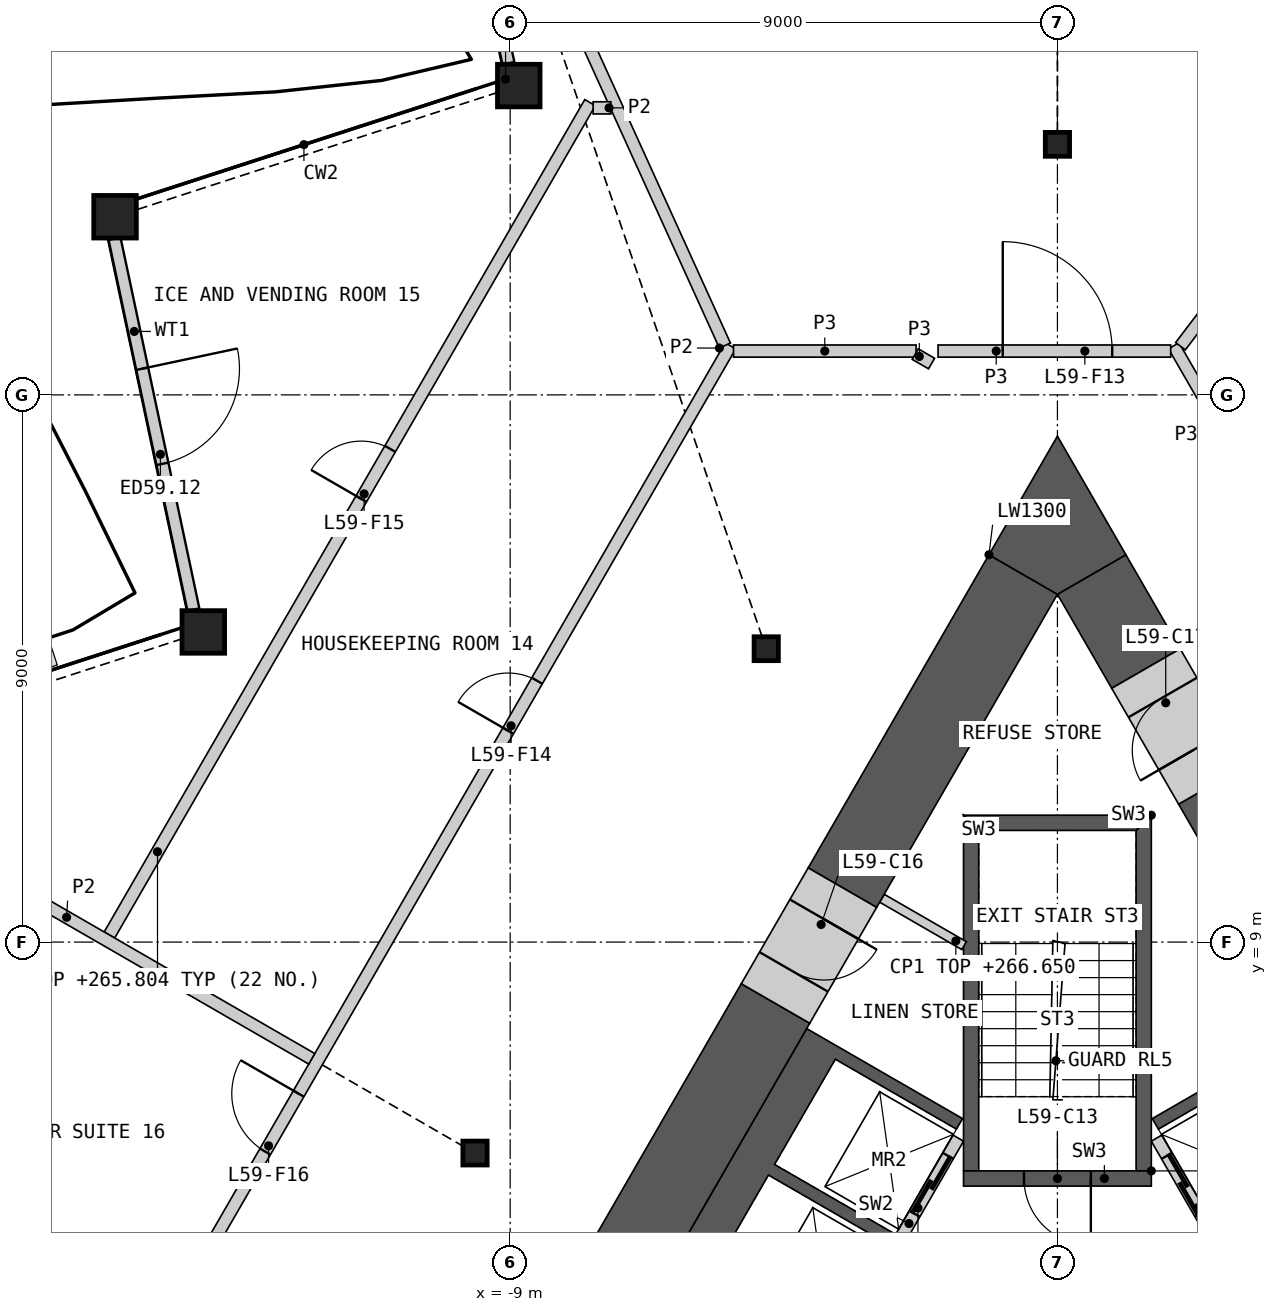
"""IFC4 building model, lengths in metres.
Left out: names, types, materials, properties, quantities, classifications, styles, units other than length and angle.
Written with IfcOpenShell. Run it as: python <this file> out.ifc"""

import sys

from ifc_helpers import new_model, si_unit, direction, frame, frame_2d, origin, origin_2d, place, context, subcontext, project, spatial, polyline, rectangle, hollow_rectangle, i_section, outline, extrude, element, fill, save


model = new_model("IFC4")
c1 = context("Model", 3, precision=1e-05, world=origin(), true_north=direction((0.0, 1.0)))
c2 = subcontext(c1, "Body", "Model", "MODEL_VIEW")
j1 = project(units=[si_unit("LENGTHUNIT", "METRE"), si_unit("PLANEANGLEUNIT", "RADIAN")], contexts=[c1])
p1 = place(None, origin())
s1 = spatial("IfcSite", under=j1, at=p1, CompositionType="ELEMENT")
p2 = place(p1, origin())
s2 = spatial("IfcBuilding", under=s1, at=p2, CompositionType="ELEMENT")
p3 = place(p2, frame((0.0, 0.0, 263.4)))
s3 = spatial("IfcBuildingStorey", under=s2, at=p3, CompositionType="ELEMENT", Elevation=263.4)
for number, where, z_axis, x_axis in (
    (1, (-8.859, 23.087, 0.0), (0.0, 0.0, 1.0), (1.0, 0.0, 0.0)),
    (2, (-15.499, 20.93, 0.0), (0.0, 0.0, 1.0), (1.0, 0.0, 0.0)),
    (3, (-14.047, 14.101, 0.0), (0.0, 0.0, 1.0), (1.0, 0.0, 0.0)),
):
    element("IfcColumn", number, at=place(p3, frame(where, z_axis=z_axis, x_axis=x_axis)), inside=s3, PredefinedType="COLUMN", context=c2, shape_type="SweptSolid", body=[
        extrude(hollow_rectangle(XDim=0.7, YDim=0.7, WallThickness=0.045, at=origin_2d()), origin(), (0.0, 0.0, 1.0), 3.6),
    ])
for number, where, z_axis, x_axis in (
    (4, (0.0, 22.121, 0.0), (0.0, 0.0, 1.0), (1.0, 0.0, 0.0)),
    (5, (-4.789, 13.825, 0.0), (0.0, 0.0, 1.0), (1.0, 0.0, 0.0)),
    (6, (-9.578, 5.53, 0.0), (0.0, 0.0, 1.0), (1.0, 0.0, 0.0)),
):
    element("IfcColumn", number, at=place(p3, frame(where, z_axis=z_axis, x_axis=x_axis)), inside=s3, PredefinedType="COLUMN", context=c2, shape_type="SweptSolid", body=[
        extrude(i_section(OverallWidth=0.399, OverallDepth=0.393, WebThickness=0.023, FlangeThickness=0.037, at=origin_2d()), origin(), (0.0, 0.0, 1.0), 3.6),
    ])
p4 = place(p3, frame((-10.324, 29.545, 0.0), z_axis=(0.0, 0.0, 1.0), x_axis=(0.207930490886, -0.978143604467, 0.0)))
e7 = element("IfcWall", 7, at=p4, inside=s3, PredefinedType="SOLIDWALL", context=c2, shape_type="SweptSolid", body=[
    extrude(rectangle(XDim=6.228, YDim=0.2, at=frame_2d((3.114, 0.0))), origin(), (0.0, 0.0, 1.0), 2.404),
])
p5 = place(p4, frame((2.186, 0.0, 0.0)))
e8 = element("IfcOpeningElement", 8, at=p5, cuts=e7, PredefinedType="OPENING", context=c2, shape_type="SweptSolid", body=[
    extrude(rectangle(XDim=1.6, YDim=2.4, at=frame_2d((0.8, 1.2))), frame((0.0, 0.11, 0.0), z_axis=(0.0, -1.0, 0.0), x_axis=(1.0, 0.0, 0.0)), (0.0, 0.0, 1.0), 0.22),
])
p6 = place(p3, frame((-15.506, 20.569, 0.0), z_axis=(0.0, 0.0, 1.0), x_axis=(0.207911652145, -0.978147608954, 0.0)))
e9 = element("IfcWall", 9, at=p6, inside=s3, PredefinedType="SOLIDWALL", context=c2, shape_type="SweptSolid", body=[
    extrude(rectangle(XDim=6.238, YDim=0.2, at=frame_2d((3.119, 0.0))), origin(), (0.0, 0.0, 1.0), 2.701),
])
p7 = place(p6, frame((2.186, 0.0, 0.0)))
e10 = element("IfcOpeningElement", 10, at=p7, cuts=e9, PredefinedType="OPENING", context=c2, shape_type="SweptSolid", body=[
    extrude(rectangle(XDim=1.6, YDim=2.4, at=frame_2d((0.8, 1.2))), frame((0.0, 0.11, 0.0), z_axis=(0.0, -1.0, 0.0), x_axis=(1.0, 0.0, 0.0)), (0.0, 0.0, 1.0), 0.22),
])
p8 = place(p3, origin())
e11 = element("IfcWall", 11, at=p8, inside=s3, PredefinedType="SHEAR", context=c2, shape_type="SweptSolid", body=[
    extrude(outline(polyline([(5.324, 5.499), (4.931, 5.272), (2.76, 4.019), (2.66, 4.192), (4.652, 5.342), (3.652, 7.074), (1.66, 5.924), (1.561, 6.097), (3.731, 7.35), (4.124, 7.577), (5.324, 5.499)])), origin(), (0.0, 0.0, 1.0), 3.25),
])
p9 = place(p3, frame((5.817, -1.476, 0.0), z_axis=(0.0, 0.0, 1.0), x_axis=(-0.500002616675, 0.866023893041, 0.0)))
e12 = element("IfcWall", 12, at=p9, inside=s3, PredefinedType="SOLIDWALL", context=c2, shape_type="SweptSolid", body=[
    extrude(rectangle(XDim=8.373, YDim=0.2, at=frame_2d((4.187, 0.0))), origin(), (0.0, 0.0, 1.0), 3.25),
])
p10 = place(p9, frame((1.537, 0.0, 0.0)))
e13 = element("IfcOpeningElement", 13, at=p10, cuts=e12, PredefinedType="OPENING", context=c2, shape_type="SweptSolid", body=[
    extrude(rectangle(XDim=0.9, YDim=2.1, at=frame_2d((0.45, 1.05))), frame((0.0, 0.11, 0.0), z_axis=(0.0, -1.0, 0.0), x_axis=(1.0, 0.0, 0.0)), (0.0, 0.0, 1.0), 0.22),
])
p11 = place(p9, frame((4.837, 0.0, 0.0)))
e14 = element("IfcOpeningElement", 14, at=p11, cuts=e12, PredefinedType="OPENING", context=c2, shape_type="SweptSolid", body=[
    extrude(rectangle(XDim=0.9, YDim=2.1, at=frame_2d((0.45, 1.05))), frame((0.0, 0.11, 0.0), z_axis=(0.0, -1.0, 0.0), x_axis=(1.0, 0.0, 0.0)), (0.0, 0.0, 1.0), 0.22),
])
p12 = place(p9, frame((6.937, 0.0, 0.0)))
e15 = element("IfcOpeningElement", 15, at=p12, cuts=e12, PredefinedType="OPENING", context=c2, shape_type="SweptSolid", body=[
    extrude(rectangle(XDim=1.1, YDim=2.1, at=frame_2d((0.55, 1.05))), frame((0.0, 0.11, 0.0), z_axis=(0.0, -1.0, 0.0), x_axis=(1.0, 0.0, 0.0)), (0.0, 0.0, 1.0), 0.22),
])
p13 = place(p3, origin())
e16 = element("IfcWall", 16, at=p13, inside=s3, PredefinedType="SHEAR", context=c2, shape_type="SweptSolid", body=[
    extrude(outline(polyline([(-7.524, 1.688), (-4.124, 7.577), (-3.731, 7.35), (-1.561, 6.097), (-1.66, 5.924), (-3.652, 7.074), (-4.652, 5.342), (-2.66, 4.192), (-2.76, 4.019), (-4.752, 5.169), (-5.752, 3.437), (-3.76, 2.287), (-3.861, 2.113), (-5.852, 3.263), (-6.852, 1.531), (-4.861, 0.381), (-4.96, 0.208), (-7.131, 1.461), (-7.524, 1.688)])), origin(), (0.0, 0.0, 1.0), 3.25),
])
p14 = place(p3, frame((-1.631, 5.776, 0.0), z_axis=(0.0, 0.0, 1.0), x_axis=(-0.499992876559, -0.866029516466, 0.0)))
e17 = element("IfcWall", 17, at=p14, inside=s3, PredefinedType="SOLIDWALL", context=c2, shape_type="SweptSolid", body=[
    extrude(rectangle(XDim=6.486, YDim=0.2, at=frame_2d((3.243, 0.0))), origin(), (0.0, 0.0, 1.0), 3.25),
])
p15 = place(p14, frame((0.337, 0.0, 0.0)))
e18 = element("IfcOpeningElement", 18, at=p15, cuts=e17, PredefinedType="OPENING", context=c2, shape_type="SweptSolid", body=[
    extrude(rectangle(XDim=1.1, YDim=2.1, at=frame_2d((0.55, 1.05))), frame((0.0, 0.11, 0.0), z_axis=(0.0, -1.0, 0.0), x_axis=(1.0, 0.0, 0.0)), (0.0, 0.0, 1.0), 0.22),
])
p16 = place(p14, frame((2.537, 0.0, 0.0)))
e19 = element("IfcOpeningElement", 19, at=p16, cuts=e17, PredefinedType="OPENING", context=c2, shape_type="SweptSolid", body=[
    extrude(rectangle(XDim=1.1, YDim=2.1, at=frame_2d((0.55, 1.05))), frame((0.0, 0.11, 0.0), z_axis=(0.0, -1.0, 0.0), x_axis=(1.0, 0.0, 0.0)), (0.0, 0.0, 1.0), 0.22),
])
p17 = place(p3, origin())
e20 = element("IfcWall", 20, at=p17, inside=s3, PredefinedType="SHEAR", context=c2, shape_type="SweptSolid", body=[
    extrude(outline(polyline([(1.544, 5.237), (1.544, 11.087), (1.294, 10.837), (1.294, 5.237), (1.544, 5.237)])), origin(), (0.0, 0.0, 1.0), 3.25),
])
p18 = place(p3, origin())
e21 = element("IfcWall", 21, at=p18, inside=s3, PredefinedType="SHEAR", context=c2, shape_type="SweptSolid", body=[
    extrude(outline(polyline([(1.544, 11.087), (-1.544, 11.087), (-1.294, 10.837), (1.294, 10.837), (1.544, 11.087)])), origin(), (0.0, 0.0, 1.0), 3.25),
])
p19 = place(p3, origin())
e22 = element("IfcWall", 22, at=p19, inside=s3, PredefinedType="SHEAR", context=c2, shape_type="SweptSolid", body=[
    extrude(outline(polyline([(-1.294, 10.837), (-1.544, 11.087), (-1.544, 5.237), (-1.294, 5.237), (-1.294, 10.837)])), origin(), (0.0, 0.0, 1.0), 3.25),
])
p20 = place(p3, frame((1.544, 5.112, 0.0), z_axis=(0.0, 0.0, 1.0), x_axis=(-1.0, 0.0, 0.0)))
e23 = element("IfcWall", 23, at=p20, inside=s3, PredefinedType="SHEAR", context=c2, shape_type="SweptSolid", body=[
    extrude(rectangle(XDim=3.088, YDim=0.25, at=frame_2d((1.544, 0.0))), origin(), (0.0, 0.0, 1.0), 3.25),
])
p21 = place(p20, frame((0.994, 0.0, 0.0)))
e24 = element("IfcOpeningElement", 24, at=p21, cuts=e23, PredefinedType="OPENING", context=c2, shape_type="SweptSolid", body=[
    extrude(rectangle(XDim=1.1, YDim=2.1, at=frame_2d((0.55, 1.05))), frame((0.0, 0.135, 0.0), z_axis=(0.0, -1.0, 0.0), x_axis=(1.0, 0.0, 0.0)), (0.0, 0.0, 1.0), 0.27),
])
p22 = place(p3, frame((-2.886, 9.721, 0.0), z_axis=(0.0, 0.0, 1.0), x_axis=(0.865990094875, -0.500061151839, 0.0)))
e25 = element("IfcWall", 25, at=p22, inside=s3, PredefinedType="PARTITIONING", context=c2, shape_type="SweptSolid", body=[
    extrude(rectangle(XDim=1.56, YDim=0.15, at=frame_2d((0.78, 0.0))), origin(), (0.0, 0.0, 1.0), 3.25),
])
p23 = place(p3, frame((10.081, -1.441, 0.0), z_axis=(0.0, 0.0, 1.0), x_axis=(-0.500012180433, 0.866018371294, 0.0)))
e26 = element("IfcWall", 26, at=p23, inside=s3, PredefinedType="SHEAR", context=c2, shape_type="SweptSolid", body=[
    extrude(rectangle(XDim=15.05, YDim=1.3, at=frame_2d((7.525, 0.0))), origin(), (0.0, 0.0, 1.0), 3.25),
])
p24 = place(p3, frame((1.456, 13.499, 0.0), z_axis=(0.0, 0.0, 1.0), x_axis=(-0.499990639951, 0.866030807744, 0.0)))
e27 = element("IfcWall", 27, at=p24, inside=s3, PredefinedType="SHEAR", context=c2, shape_type="SweptSolid", body=[
    extrude(rectangle(XDim=1.786, YDim=1.3, at=frame_2d((0.893, 0.0))), origin(), (0.0, 0.0, 1.0), 3.25),
])
p25 = place(p3, frame((-4.636, 7.99, 0.0), z_axis=(0.0, 0.0, 1.0), x_axis=(-0.500022813292, -0.866012232124, 0.0)))
e28 = element("IfcWall", 28, at=p25, inside=s3, PredefinedType="SHEAR", context=c2, shape_type="SweptSolid", body=[
    extrude(rectangle(XDim=6.802, YDim=1.3, at=frame_2d((3.401, 0.0))), origin(), (0.0, 0.0, 1.0), 3.25),
])
p26 = place(p3, frame((-0.563, 15.045, 0.0), z_axis=(0.0, 0.0, 1.0), x_axis=(-0.500011498138, -0.866018765229, 0.0)))
e29 = element("IfcWall", 29, at=p26, inside=s3, PredefinedType="SHEAR", context=c2, shape_type="SweptSolid", body=[
    extrude(rectangle(XDim=5.947, YDim=1.3, at=frame_2d((2.973, 0.0))), origin(), (0.0, 0.0, 1.0), 3.25),
])
p27 = place(p3, origin())
e30 = element("IfcWall", 30, at=p27, inside=s3, PredefinedType="SHEAR", context=c2, shape_type="SweptSolid", body=[
    extrude(outline(polyline([(-1.126, 15.371), (0.0, 17.321), (1.126, 15.371), (0.0, 14.72), (-1.126, 15.371)])), origin(), (0.0, 0.0, 1.0), 3.25),
])
p28 = place(p3, frame((-3.536, 9.896, 0.0), z_axis=(0.0, 0.0, 1.0), x_axis=(-0.499981787252, -0.866035918664, 0.0)))
e31 = element("IfcWall", 31, at=p28, inside=s3, PredefinedType="SHEAR", context=c2, shape_type="SweptSolid", body=[
    extrude(rectangle(XDim=2.2, YDim=1.3, at=frame_2d((1.1, 0.0))), origin(), (0.0, 0.0, 1.0), 3.25),
])
p29 = place(p28, frame((0.6, 0.0, 0.0)))
e32 = element("IfcOpeningElement", 32, at=p29, cuts=e31, PredefinedType="OPENING", context=c2, shape_type="SweptSolid", body=[
    extrude(rectangle(XDim=1.0, YDim=2.1, at=frame_2d((0.5, 1.05))), frame((0.0, 0.66, 0.0), z_axis=(0.0, -1.0, 0.0), x_axis=(1.0, 0.0, 0.0)), (0.0, 0.0, 1.0), 1.32),
])
p30 = place(p3, frame((2.556, 11.593, 0.0), z_axis=(0.0, 0.0, 1.0), x_axis=(-0.499946605688, 0.86605622881, 0.0)))
e33 = element("IfcWall", 33, at=p30, inside=s3, PredefinedType="SHEAR", context=c2, shape_type="SweptSolid", body=[
    extrude(rectangle(XDim=2.2, YDim=1.3, at=frame_2d((1.1, 0.0))), origin(), (0.0, 0.0, 1.0), 3.25),
])
p31 = place(p30, frame((0.65, 0.0, 0.0)))
e34 = element("IfcOpeningElement", 34, at=p31, cuts=e33, PredefinedType="OPENING", context=c2, shape_type="SweptSolid", body=[
    extrude(rectangle(XDim=1.0, YDim=2.1, at=frame_2d((0.5, 1.05))), frame((0.0, 0.66, 0.0), z_axis=(0.0, -1.0, 0.0), x_axis=(1.0, 0.0, 0.0)), (0.0, 0.0, 1.0), 1.32),
])
p32 = place(p3, frame((-18.976, -4.747, 0.0), z_axis=(0.0, 0.0, 1.0), x_axis=(0.499999852422, 0.866025488988, 0.0)))
e35 = element("IfcWall", 35, at=p32, inside=s3, PredefinedType="PARTITIONING", context=c2, shape_type="SweptSolid", body=[
    extrude(rectangle(XDim=27.198, YDim=0.2, at=frame_2d((13.599, 0.0))), origin(), (0.0, 0.0, 1.0), 3.25),
])
p33 = place(p32, frame((19.886, 0.0, 0.0)))
e36 = element("IfcOpeningElement", 36, at=p33, cuts=e35, PredefinedType="OPENING", context=c2, shape_type="SweptSolid", body=[
    extrude(rectangle(XDim=0.95, YDim=2.1, at=frame_2d((0.475, 1.05))), frame((0.0, 0.11, 0.0), z_axis=(0.0, -1.0, 0.0), x_axis=(1.0, 0.0, 0.0)), (0.0, 0.0, 1.0), 0.22),
])
p34 = place(p32, frame((11.895, 0.0, 0.0)))
e37 = element("IfcOpeningElement", 37, at=p34, cuts=e35, PredefinedType="OPENING", context=c2, shape_type="SweptSolid", body=[
    extrude(rectangle(XDim=1.1, YDim=2.1, at=frame_2d((0.55, 1.05))), frame((0.0, 0.11, 0.0), z_axis=(0.0, -1.0, 0.0), x_axis=(1.0, 0.0, 0.0)), (0.0, 0.0, 1.0), 0.22),
])
p35 = place(p32, frame((1.152, 0.0, 0.0)))
e38 = element("IfcOpeningElement", 38, at=p35, cuts=e35, PredefinedType="OPENING", context=c2, shape_type="SweptSolid", body=[
    extrude(rectangle(XDim=0.95, YDim=2.1, at=frame_2d((0.475, 1.05))), frame((0.0, 0.11, 0.0), z_axis=(0.0, -1.0, 0.0), x_axis=(1.0, 0.0, 0.0)), (0.0, 0.0, 1.0), 0.22),
])
p36 = place(p3, frame((1.913, 18.807, 0.0), z_axis=(0.0, 0.0, 1.0), x_axis=(0.499984524817, -0.866034338201, 0.0)))
e39 = element("IfcWall", 39, at=p36, inside=s3, PredefinedType="PARTITIONING", context=c2, shape_type="SweptSolid", body=[
    extrude(rectangle(XDim=5.51, YDim=0.2, at=frame_2d((2.755, 0.0))), origin(), (0.0, 0.0, 1.0), 3.25),
])
p37 = place(p36, frame((1.655, 0.0, 0.0)))
e40 = element("IfcOpeningElement", 40, at=p37, cuts=e39, PredefinedType="OPENING", context=c2, shape_type="SweptSolid", body=[
    extrude(rectangle(XDim=1.8, YDim=2.1, at=frame_2d((0.9, 1.05))), frame((0.0, 0.11, 0.0), z_axis=(0.0, -1.0, 0.0), x_axis=(1.0, 0.0, 0.0)), (0.0, 0.0, 1.0), 0.22),
])
p38 = place(p3, frame((-1.963, 18.72, 0.0), z_axis=(0.0, 0.0, 1.0), x_axis=(1.0, 0.0, 0.0)))
e41 = element("IfcWall", 41, at=p38, inside=s3, PredefinedType="PARTITIONING", context=c2, shape_type="SweptSolid", body=[
    extrude(rectangle(XDim=3.826, YDim=0.2, at=frame_2d((1.913, 0.0))), origin(), (0.0, 0.0, 1.0), 3.25),
])
p39 = place(p38, frame((1.064, 0.0, 0.0)))
e42 = element("IfcOpeningElement", 42, at=p39, cuts=e41, PredefinedType="OPENING", context=c2, shape_type="SweptSolid", body=[
    extrude(rectangle(XDim=1.8, YDim=2.1, at=frame_2d((0.9, 1.05))), frame((0.0, 0.11, 0.0), z_axis=(0.0, -1.0, 0.0), x_axis=(1.0, 0.0, 0.0)), (0.0, 0.0, 1.0), 0.22),
])
p40 = place(p3, frame((-5.327, 18.72, 0.0), z_axis=(0.0, 0.0, 1.0), x_axis=(1.0, 0.0, 0.0)))
e43 = element("IfcWall", 43, at=p40, inside=s3, PredefinedType="PARTITIONING", context=c2, shape_type="SweptSolid", body=[
    extrude(rectangle(XDim=3.002, YDim=0.2, at=frame_2d((1.501, 0.0))), origin(), (0.0, 0.0, 1.0), 3.25),
])
p41 = place(p3, frame((-2.338, 18.67, 0.0), z_axis=(0.0, 0.0, 1.0), x_axis=(0.866054481515, -0.499949632511, 0.0)))
e44 = element("IfcWall", 44, at=p41, inside=s3, PredefinedType="PARTITIONING", context=c2, shape_type="SweptSolid", body=[
    extrude(rectangle(XDim=0.31, YDim=0.2, at=frame_2d((0.155, 0.0))), origin(), (0.0, 0.0, 1.0), 3.25),
])
p42 = place(p3, frame((-15.591, 9.117, 0.0), z_axis=(0.0, 0.0, 1.0), x_axis=(0.499994281579, 0.866028705291, 0.0)))
e45 = element("IfcWall", 45, at=p42, inside=s3, PredefinedType="PARTITIONING", context=c2, shape_type="SweptSolid", body=[
    extrude(rectangle(XDim=15.808, YDim=0.2, at=frame_2d((7.904, 0.0))), origin(), (0.0, 0.0, 1.0), 2.404),
])
p43 = place(p42, frame((8.283, 0.0, 0.0)))
e46 = element("IfcOpeningElement", 46, at=p43, cuts=e45, PredefinedType="OPENING", context=c2, shape_type="SweptSolid", body=[
    extrude(rectangle(XDim=0.95, YDim=2.1, at=frame_2d((0.475, 1.05))), frame((0.0, 0.11, 0.0), z_axis=(0.0, -1.0, 0.0), x_axis=(1.0, 0.0, 0.0)), (0.0, 0.0, 1.0), 0.22),
])
p44 = place(p3, frame((2.024, 18.8, 0.0), z_axis=(0.0, 0.0, 1.0), x_axis=(0.605225740135, 0.796053894832, 0.0)))
e47 = element("IfcWall", 47, at=p44, inside=s3, PredefinedType="PARTITIONING", context=c2, shape_type="SweptSolid", body=[
    extrude(rectangle(XDim=13.511, YDim=0.2, at=frame_2d((6.756, 0.0))), origin(), (0.0, 0.0, 1.0), 2.404),
])
p45 = place(p3, origin())
e48 = element("IfcWall", 48, at=p45, inside=s3, PredefinedType="PARTITIONING", context=c2, shape_type="SweptSolid", body=[
    extrude(outline(polyline([(-5.56, 18.77), (-10.017, 28.582), (-10.21, 29.491), (-5.377, 18.853), (-5.56, 18.77)])), origin(), (0.0, 0.0, 1.0), 2.404),
])
p46 = place(p3, frame((-20.327, 11.736, 0.0), z_axis=(0.0, 0.0, 1.0), x_axis=(0.866022277917, -0.500005414122, 0.0)))
e49 = element("IfcWall", 49, at=p46, inside=s3, PredefinedType="PARTITIONING", context=c2, shape_type="SweptSolid", body=[
    extrude(rectangle(XDim=9.311, YDim=0.2, at=frame_2d((4.656, 0.0))), origin(), (0.0, 0.0, 1.0), 2.404),
])
p47 = place(p3, frame((-7.636, 22.72, 0.0), z_axis=(0.0, 0.0, 1.0), x_axis=(1.0, 0.0, 0.0)))
e50 = element("IfcWall", 50, at=p47, inside=s3, PredefinedType="PARTITIONING", context=c2, shape_type="SweptSolid", body=[
    extrude(rectangle(XDim=0.292, YDim=0.2, at=frame_2d((0.146, 0.0))), origin(), (0.0, 0.0, 1.0), 2.404),
])
p48 = place(p7, origin())
e51 = element("IfcDoor", 51, at=p48, inside=s3, OperationType="DOUBLE_DOOR_SINGLE_SWING", PredefinedType="DOOR", context=c2, shape_type="SweptSolid", body=[
    extrude(rectangle(XDim=1.6, YDim=2.4, at=frame_2d((0.8, 1.2))), frame((0.0, 0.025, 0.0), z_axis=(0.0, -1.0, 0.0), x_axis=(1.0, 0.0, 0.0)), (0.0, 0.0, 1.0), 0.05),
])
fill(e10, e51)
p49 = place(p12, origin())
e52 = element("IfcDoor", 52, at=p49, inside=s3, OperationType="SLIDING_TO_LEFT", PredefinedType="DOOR", context=c2, shape_type="SweptSolid", body=[
    extrude(rectangle(XDim=1.1, YDim=2.1, at=frame_2d((0.55, 1.05))), frame((0.0, 0.025, 0.0), z_axis=(0.0, -1.0, 0.0), x_axis=(1.0, 0.0, 0.0)), (0.0, 0.0, 1.0), 0.05),
])
fill(e15, e52)
p50 = place(p15, origin())
e53 = element("IfcDoor", 53, at=p50, inside=s3, OperationType="SLIDING_TO_LEFT", PredefinedType="DOOR", context=c2, shape_type="SweptSolid", body=[
    extrude(rectangle(XDim=1.1, YDim=2.1, at=frame_2d((0.55, 1.05))), frame((0.0, 0.025, 0.0), z_axis=(0.0, -1.0, 0.0), x_axis=(1.0, 0.0, 0.0)), (0.0, 0.0, 1.0), 0.05),
])
fill(e18, e53)
p51 = place(p21, origin())
e54 = element("IfcDoor", 54, at=p51, inside=s3, OperationType="SINGLE_SWING_LEFT", PredefinedType="DOOR", context=c2, shape_type="SweptSolid", body=[
    extrude(rectangle(XDim=1.1, YDim=2.1, at=frame_2d((0.55, 1.05))), frame((0.0, 0.025, 0.0), z_axis=(0.0, -1.0, 0.0), x_axis=(1.0, 0.0, 0.0)), (0.0, 0.0, 1.0), 0.05),
])
fill(e24, e54)
p52 = place(p29, origin())
e55 = element("IfcDoor", 55, at=p52, inside=s3, OperationType="SINGLE_SWING_LEFT", PredefinedType="DOOR", context=c2, shape_type="SweptSolid", body=[
    extrude(rectangle(XDim=1.0, YDim=2.1, at=frame_2d((0.5, 1.05))), frame((0.0, 0.405, 0.0), z_axis=(0.0, -1.0, 0.0), x_axis=(1.0, 0.0, 0.0)), (0.0, 0.0, 1.0), 0.05),
])
fill(e32, e55)
p53 = place(p31, origin())
e56 = element("IfcDoor", 56, at=p53, inside=s3, OperationType="SINGLE_SWING_LEFT", PredefinedType="DOOR", context=c2, shape_type="SweptSolid", body=[
    extrude(rectangle(XDim=1.0, YDim=2.1, at=frame_2d((0.5, 1.05))), frame((0.0, 0.405, 0.0), z_axis=(0.0, -1.0, 0.0), x_axis=(1.0, 0.0, 0.0)), (0.0, 0.0, 1.0), 0.05),
])
fill(e34, e56)
p54 = place(p39, origin())
e57 = element("IfcDoor", 57, at=p54, inside=s3, OperationType="DOUBLE_DOOR_SINGLE_SWING", PredefinedType="DOOR", context=c2, shape_type="SweptSolid", body=[
    extrude(rectangle(XDim=1.8, YDim=2.1, at=frame_2d((0.9, 1.05))), frame((0.0, 0.025, 0.0), z_axis=(0.0, -1.0, 0.0), x_axis=(1.0, 0.0, 0.0)), (0.0, 0.0, 1.0), 0.05),
])
fill(e42, e57)
p55 = place(p33, origin())
e58 = element("IfcDoor", 58, at=p55, inside=s3, OperationType="SINGLE_SWING_LEFT", PredefinedType="DOOR", context=c2, shape_type="SweptSolid", body=[
    extrude(rectangle(XDim=0.95, YDim=2.1, at=frame_2d((0.475, 1.05))), frame((0.0, 0.025, 0.0), z_axis=(0.0, -1.0, 0.0), x_axis=(1.0, 0.0, 0.0)), (0.0, 0.0, 1.0), 0.05),
])
fill(e36, e58)
p56 = place(p43, origin())
e59 = element("IfcDoor", 59, at=p56, inside=s3, OperationType="SINGLE_SWING_LEFT", PredefinedType="DOOR", context=c2, shape_type="SweptSolid", body=[
    extrude(rectangle(XDim=0.95, YDim=2.1, at=frame_2d((0.475, 1.05))), frame((0.0, 0.025, 0.0), z_axis=(0.0, -1.0, 0.0), x_axis=(1.0, 0.0, 0.0)), (0.0, 0.0, 1.0), 0.05),
])
fill(e46, e59)
p57 = place(p34, origin())
e60 = element("IfcDoor", 60, at=p57, inside=s3, OperationType="SINGLE_SWING_RIGHT", PredefinedType="DOOR", context=c2, shape_type="SweptSolid", body=[
    extrude(rectangle(XDim=1.1, YDim=2.1, at=frame_2d((0.55, 1.05))), frame((0.0, 0.025, 0.0), z_axis=(0.0, -1.0, 0.0), x_axis=(1.0, 0.0, 0.0)), (0.0, 0.0, 1.0), 0.05),
])
fill(e37, e60)
save(model, sys.argv[1])
